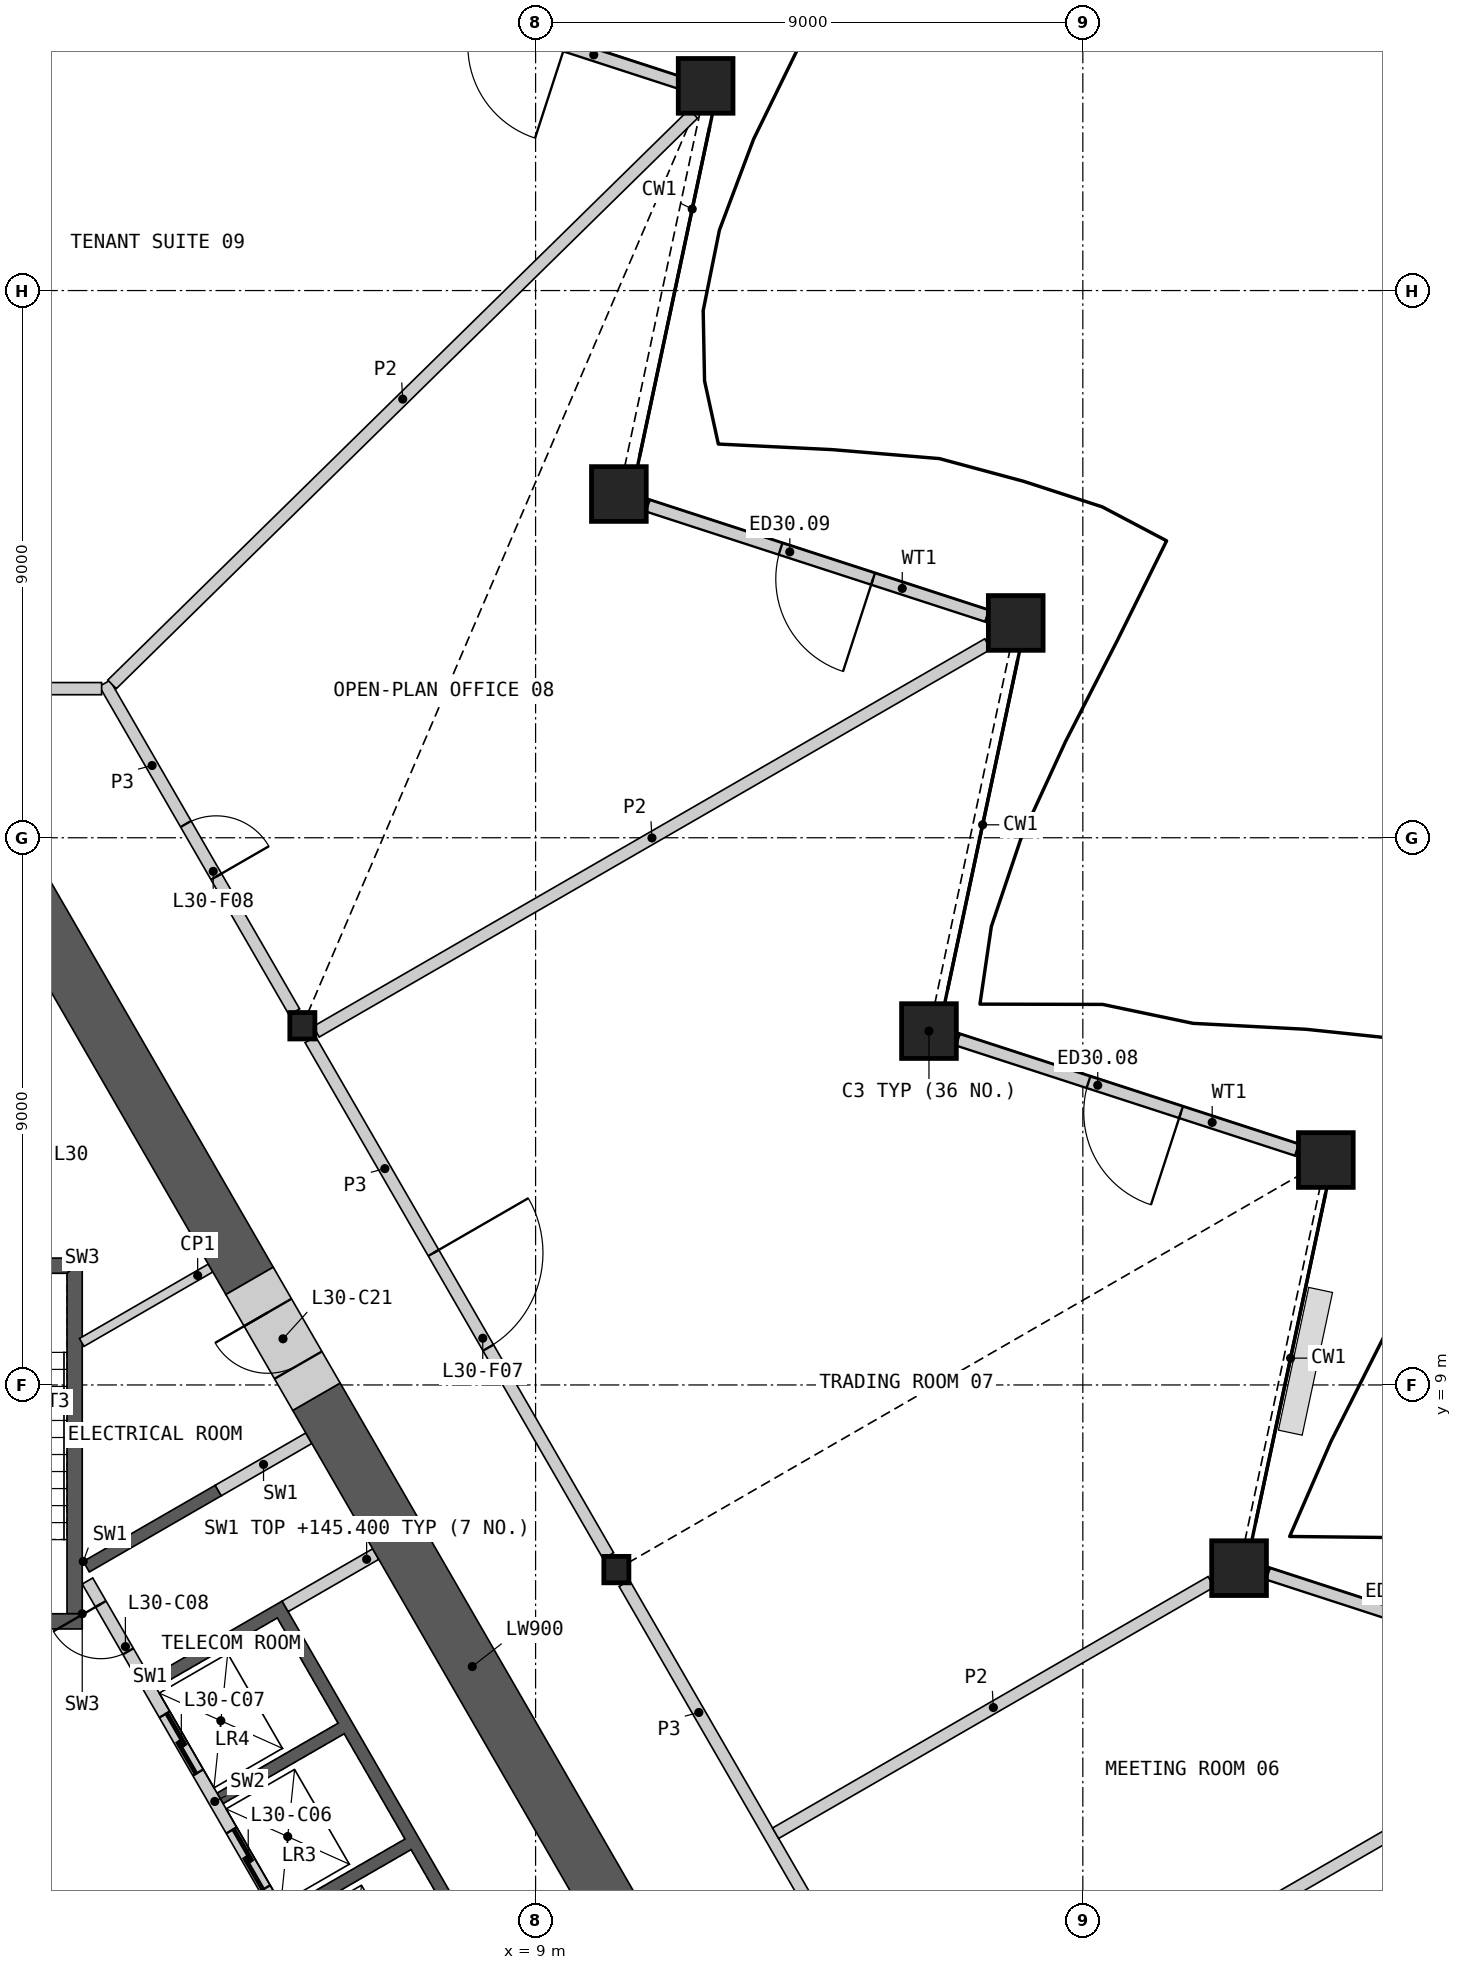
"""IFC4 building model, lengths in metres.
Left out: names, types, materials, properties, quantities, classifications, styles, units other than length and angle.
Written with IfcOpenShell. Run it as: python <this file> out.ifc"""

import sys

from ifc_helpers import new_model, si_unit, direction, frame, frame_2d, origin, origin_2d, place, context, subcontext, project, spatial, polyline, rectangle, hollow_rectangle, i_section, outline, extrude, element, fill, save


model = new_model("IFC4")
c1 = context("Model", 3, precision=1e-05, world=origin(), true_north=direction((0.0, 1.0)))
c2 = subcontext(c1, "Body", "Model", "MODEL_VIEW")
j1 = project(units=[si_unit("LENGTHUNIT", "METRE"), si_unit("PLANEANGLEUNIT", "RADIAN")], contexts=[c1])
p1 = place(None, origin())
s1 = spatial("IfcSite", under=j1, at=p1, CompositionType="ELEMENT")
p2 = place(p1, origin())
s2 = spatial("IfcBuilding", under=s1, at=p2, CompositionType="ELEMENT")
p3 = place(p2, frame((0.0, 0.0, 141.6)))
s3 = spatial("IfcBuildingStorey", under=s2, at=p3, CompositionType="ELEMENT", Elevation=141.6)
for number, where, z_axis, x_axis in (
    (1, (20.57, 5.987, 0.0), (0.0, 0.0, 1.0), (1.0, 0.0, 0.0)),
    (2, (21.996, 12.699, 0.0), (0.0, 0.0, 1.0), (1.0, 0.0, 0.0)),
    (3, (15.469, 14.82, 0.0), (0.0, 0.0, 1.0), (1.0, 0.0, 0.0)),
    (4, (16.896, 21.533, 0.0), (0.0, 0.0, 1.0), (1.0, 0.0, 0.0)),
    (5, (10.37, 23.654, 0.0), (0.0, 0.0, 1.0), (1.0, 0.0, 0.0)),
    (6, (11.796, 30.366, 0.0), (0.0, 0.0, 1.0), (1.0, 0.0, 0.0)),
):
    element("IfcColumn", number, at=place(p3, frame(where, z_axis=z_axis, x_axis=x_axis)), inside=s3, PredefinedType="COLUMN", context=c2, shape_type="SweptSolid", body=[
        extrude(hollow_rectangle(XDim=0.9, YDim=0.9, WallThickness=0.06, at=origin_2d()), origin(), (0.0, 0.0, 1.0), 4.2),
    ])
for number, where, z_axis, x_axis in (
    (7, (10.328, 5.963, 0.0), (0.0, 0.0, 1.0), (1.0, 0.0, 0.0)),
    (8, (5.164, 14.908, 0.0), (0.0, 0.0, 1.0), (1.0, 0.0, 0.0)),
):
    element("IfcColumn", number, at=place(p3, frame(where, z_axis=z_axis, x_axis=x_axis)), inside=s3, PredefinedType="COLUMN", context=c2, shape_type="SweptSolid", body=[
        extrude(i_section(OverallWidth=0.412, OverallDepth=0.435, WebThickness=0.036, FlangeThickness=0.057, at=origin_2d()), origin(), (0.0, 0.0, 1.0), 4.2),
    ])
p4 = place(p3, frame((26.622, 4.082, 0.0), z_axis=(0.0, 0.0, 1.0), x_axis=(-0.951053952554, 0.309024884649, 0.0)))
e9 = element("IfcWall", 9, at=p4, inside=s3, PredefinedType="SOLIDWALL", context=c2, shape_type="SweptSolid", body=[
    extrude(rectangle(XDim=5.865, YDim=0.2, at=frame_2d((2.932, 0.0))), origin(), (0.0, 0.0, 1.0), 3.189),
])
p5 = place(p4, frame((2.042, 0.0, 0.0)))
e10 = element("IfcOpeningElement", 10, at=p5, cuts=e9, PredefinedType="OPENING", context=c2, shape_type="SweptSolid", body=[
    extrude(rectangle(XDim=1.6, YDim=2.4, at=frame_2d((0.8, 1.2))), frame((0.0, 0.11, 0.0), z_axis=(0.0, -1.0, 0.0), x_axis=(1.0, 0.0, 0.0)), (0.0, 0.0, 1.0), 0.22),
])
p6 = place(p3, frame((21.521, 12.865, 0.0), z_axis=(0.0, 0.0, 1.0), x_axis=(-0.951049976734, 0.309037120351, 0.0)))
e11 = element("IfcWall", 11, at=p6, inside=s3, PredefinedType="SOLIDWALL", context=c2, shape_type="SweptSolid", body=[
    extrude(rectangle(XDim=5.864, YDim=0.2, at=frame_2d((2.932, 0.0))), origin(), (0.0, 0.0, 1.0), 3.189),
])
p7 = place(p6, frame((2.005, 0.0, 0.0)))
e12 = element("IfcOpeningElement", 12, at=p7, cuts=e11, PredefinedType="OPENING", context=c2, shape_type="SweptSolid", body=[
    extrude(rectangle(XDim=1.6, YDim=2.4, at=frame_2d((0.8, 1.2))), frame((0.0, 0.11, 0.0), z_axis=(0.0, -1.0, 0.0), x_axis=(1.0, 0.0, 0.0)), (0.0, 0.0, 1.0), 0.22),
])
p8 = place(p3, frame((16.425, 21.647, 0.0), z_axis=(0.0, 0.0, 1.0), x_axis=(-0.951060665462, 0.309004224261, 0.0)))
e13 = element("IfcWall", 13, at=p8, inside=s3, PredefinedType="SOLIDWALL", context=c2, shape_type="SweptSolid", body=[
    extrude(rectangle(XDim=5.868, YDim=0.2, at=frame_2d((2.934, 0.0))), origin(), (0.0, 0.0, 1.0), 3.189),
])
p9 = place(p8, frame((1.971, 0.0, 0.0)))
e14 = element("IfcOpeningElement", 14, at=p9, cuts=e13, PredefinedType="OPENING", context=c2, shape_type="SweptSolid", body=[
    extrude(rectangle(XDim=1.6, YDim=2.4, at=frame_2d((0.8, 1.2))), frame((0.0, 0.11, 0.0), z_axis=(0.0, -1.0, 0.0), x_axis=(1.0, 0.0, 0.0)), (0.0, 0.0, 1.0), 0.22),
])
p10 = place(p3, frame((11.361, 30.419, 0.0), z_axis=(0.0, 0.0, 1.0), x_axis=(-0.951049866095, 0.309037460836, 0.0)))
e15 = element("IfcWall", 15, at=p10, inside=s3, PredefinedType="SOLIDWALL", context=c2, shape_type="SweptSolid", body=[
    extrude(rectangle(XDim=5.905, YDim=0.2, at=frame_2d((2.953, 0.0))), origin(), (0.0, 0.0, 1.0), 3.189),
])
p11 = place(p10, frame((1.971, 0.0, 0.0)))
e16 = element("IfcOpeningElement", 16, at=p11, cuts=e15, PredefinedType="OPENING", context=c2, shape_type="SweptSolid", body=[
    extrude(rectangle(XDim=1.6, YDim=2.4, at=frame_2d((0.8, 1.2))), frame((0.0, 0.11, 0.0), z_axis=(0.0, -1.0, 0.0), x_axis=(1.0, 0.0, 0.0)), (0.0, 0.0, 1.0), 0.22),
])
p12 = place(p3, origin())
e17 = element("IfcWall", 17, at=p12, inside=s3, PredefinedType="SHEAR", context=c2, shape_type="SweptSolid", body=[
    extrude(outline(polyline([(1.561, 6.097), (3.731, 7.35), (3.831, 7.177), (1.66, 5.924), (1.561, 6.097)])), origin(), (0.0, 0.0, 1.0), 3.8),
])
p13 = place(p3, origin())
e18 = element("IfcWall", 18, at=p13, inside=s3, PredefinedType="SHEAR", context=c2, shape_type="SweptSolid", body=[
    extrude(outline(polyline([(2.66, 4.192), (4.831, 5.445), (8.231, -0.444), (6.061, -1.697), (5.96, -1.524), (7.952, -0.374), (6.952, 1.358), (4.96, 0.208), (4.861, 0.381), (6.852, 1.531), (5.852, 3.263), (3.861, 2.113), (3.76, 2.287), (5.752, 3.437), (4.752, 5.169), (2.76, 4.019), (2.66, 4.192)])), origin(), (0.0, 0.0, 1.0), 3.8),
])
p14 = place(p3, frame((5.817, -1.476, 0.0), z_axis=(0.0, 0.0, 1.0), x_axis=(-0.500002616675, 0.866023893041, 0.0)))
e19 = element("IfcWall", 19, at=p14, inside=s3, PredefinedType="SOLIDWALL", context=c2, shape_type="SweptSolid", body=[
    extrude(rectangle(XDim=8.373, YDim=0.2, at=frame_2d((4.187, 0.0))), origin(), (0.0, 0.0, 1.0), 3.8),
])
p15 = place(p14, frame((0.337, 0.0, 0.0)))
e20 = element("IfcOpeningElement", 20, at=p15, cuts=e19, PredefinedType="OPENING", context=c2, shape_type="SweptSolid", body=[
    extrude(rectangle(XDim=1.1, YDim=2.1, at=frame_2d((0.55, 1.05))), frame((0.0, 0.11, 0.0), z_axis=(0.0, -1.0, 0.0), x_axis=(1.0, 0.0, 0.0)), (0.0, 0.0, 1.0), 0.22),
])
p16 = place(p14, frame((2.537, 0.0, 0.0)))
e21 = element("IfcOpeningElement", 21, at=p16, cuts=e19, PredefinedType="OPENING", context=c2, shape_type="SweptSolid", body=[
    extrude(rectangle(XDim=1.1, YDim=2.1, at=frame_2d((0.55, 1.05))), frame((0.0, 0.11, 0.0), z_axis=(0.0, -1.0, 0.0), x_axis=(1.0, 0.0, 0.0)), (0.0, 0.0, 1.0), 0.22),
])
p17 = place(p14, frame((4.737, 0.0, 0.0)))
e22 = element("IfcOpeningElement", 22, at=p17, cuts=e19, PredefinedType="OPENING", context=c2, shape_type="SweptSolid", body=[
    extrude(rectangle(XDim=1.1, YDim=2.1, at=frame_2d((0.55, 1.05))), frame((0.0, 0.11, 0.0), z_axis=(0.0, -1.0, 0.0), x_axis=(1.0, 0.0, 0.0)), (0.0, 0.0, 1.0), 0.22),
])
p18 = place(p14, frame((7.037, 0.0, 0.0)))
e23 = element("IfcOpeningElement", 23, at=p18, cuts=e19, PredefinedType="OPENING", context=c2, shape_type="SweptSolid", body=[
    extrude(rectangle(XDim=0.9, YDim=2.1, at=frame_2d((0.45, 1.05))), frame((0.0, 0.11, 0.0), z_axis=(0.0, -1.0, 0.0), x_axis=(1.0, 0.0, 0.0)), (0.0, 0.0, 1.0), 0.22),
])
for number, where, z_axis, x_axis in (
    (24, (4.881, 5.358, 0.0), (0.0, 0.0, 1.0), (0.866, 0.5, 0.0)),
    (25, (3.781, 7.263, 0.0), (0.0, 0.0, 1.0), (0.866, 0.5, 0.0)),
):
    element("IfcWall", number, at=place(p3, frame(where, z_axis=z_axis, x_axis=x_axis)), inside=s3, PredefinedType="SHEAR", context=c2, shape_type="SweptSolid", body=[
        extrude(rectangle(XDim=1.72, YDim=0.2, at=frame_2d((0.86, 0.0))), origin(), (0.0, 0.0, 1.0), 3.8),
    ])
p19 = place(p3, origin())
e26 = element("IfcWall", 26, at=p19, inside=s3, PredefinedType="SHEAR", context=c2, shape_type="SweptSolid", body=[
    extrude(outline(polyline([(1.544, 5.237), (1.544, 11.087), (1.294, 10.837), (1.294, 5.237), (1.544, 5.237)])), origin(), (0.0, 0.0, 1.0), 3.8),
])
p20 = place(p3, origin())
e27 = element("IfcWall", 27, at=p20, inside=s3, PredefinedType="SHEAR", context=c2, shape_type="SweptSolid", body=[
    extrude(outline(polyline([(1.544, 11.087), (-1.544, 11.087), (-1.294, 10.837), (1.294, 10.837), (1.544, 11.087)])), origin(), (0.0, 0.0, 1.0), 3.8),
])
p21 = place(p3, frame((1.544, 5.112, 0.0), z_axis=(0.0, 0.0, 1.0), x_axis=(-1.0, 0.0, 0.0)))
e28 = element("IfcWall", 28, at=p21, inside=s3, PredefinedType="SHEAR", context=c2, shape_type="SweptSolid", body=[
    extrude(rectangle(XDim=3.088, YDim=0.25, at=frame_2d((1.544, 0.0))), origin(), (0.0, 0.0, 1.0), 3.8),
])
p22 = place(p21, frame((0.994, 0.0, 0.0)))
e29 = element("IfcOpeningElement", 29, at=p22, cuts=e28, PredefinedType="OPENING", context=c2, shape_type="SweptSolid", body=[
    extrude(rectangle(XDim=1.1, YDim=2.1, at=frame_2d((0.55, 1.05))), frame((0.0, 0.135, 0.0), z_axis=(0.0, -1.0, 0.0), x_axis=(1.0, 0.0, 0.0)), (0.0, 0.0, 1.0), 0.27),
])
p23 = place(p3, frame((3.654, 10.923, 0.0), z_axis=(0.0, 0.0, 1.0), x_axis=(-0.865974546186, -0.5000880776, 0.0)))
e30 = element("IfcWall", 30, at=p23, inside=s3, PredefinedType="PARTITIONING", context=c2, shape_type="SweptSolid", body=[
    extrude(rectangle(XDim=2.447, YDim=0.15, at=frame_2d((1.223, 0.0))), origin(), (0.0, 0.0, 1.0), 3.8),
])
p24 = place(p3, frame((10.521, -0.07, 0.0), z_axis=(0.0, 0.0, 1.0), x_axis=(-0.499997384719, 0.866026913713, 0.0)))
e31 = element("IfcWall", 31, at=p24, inside=s3, PredefinedType="SHEAR", context=c2, shape_type="SweptSolid", body=[
    extrude(rectangle(XDim=10.249, YDim=0.9, at=frame_2d((5.125, 0.0))), origin(), (0.0, 0.0, 1.0), 3.8),
])
p25 = place(p3, frame((4.296, 10.712, 0.0), z_axis=(0.0, 0.0, 1.0), x_axis=(-0.500011000363, 0.866019052629, 0.0)))
e32 = element("IfcWall", 32, at=p25, inside=s3, PredefinedType="SHEAR", context=c2, shape_type="SweptSolid", body=[
    extrude(rectangle(XDim=7.812, YDim=0.9, at=frame_2d((3.906, 0.0))), origin(), (0.0, 0.0, 1.0), 3.8),
])
p26 = place(p3, frame((5.396, 8.806, 0.0), z_axis=(0.0, 0.0, 1.0), x_axis=(-0.499981787252, 0.866035918664, 0.0)))
e33 = element("IfcWall", 33, at=p26, inside=s3, PredefinedType="SHEAR", context=c2, shape_type="SweptSolid", body=[
    extrude(rectangle(XDim=2.2, YDim=0.9, at=frame_2d((1.1, 0.0))), origin(), (0.0, 0.0, 1.0), 3.8),
])
p27 = place(p26, frame((0.6, 0.0, 0.0)))
e34 = element("IfcOpeningElement", 34, at=p27, cuts=e33, PredefinedType="OPENING", context=c2, shape_type="SweptSolid", body=[
    extrude(rectangle(XDim=1.0, YDim=2.1, at=frame_2d((0.5, 1.05))), frame((0.0, 0.46, 0.0), z_axis=(0.0, -1.0, 0.0), x_axis=(1.0, 0.0, 0.0)), (0.0, 0.0, 1.0), 0.92),
])
p28 = place(p3, frame((10.46, 5.736, 0.0), z_axis=(0.0, 0.0, 1.0), x_axis=(0.500004141693, -0.866023012564, 0.0)))
e35 = element("IfcWall", 35, at=p28, inside=s3, PredefinedType="PARTITIONING", context=c2, shape_type="SweptSolid", body=[
    extrude(rectangle(XDim=9.803, YDim=0.2, at=frame_2d((4.902, 0.0))), origin(), (0.0, 0.0, 1.0), 3.8),
])
p29 = place(p28, frame((6.853, 0.0, 0.0)))
e36 = element("IfcOpeningElement", 36, at=p29, cuts=e35, PredefinedType="OPENING", context=c2, shape_type="SweptSolid", body=[
    extrude(rectangle(XDim=1.0, YDim=2.1, at=frame_2d((0.5, 1.05))), frame((0.0, 0.11, 0.0), z_axis=(0.0, -1.0, 0.0), x_axis=(1.0, 0.0, 0.0)), (0.0, 0.0, 1.0), 0.22),
])
p30 = place(p3, frame((5.295, 14.68, 0.0), z_axis=(0.0, 0.0, 1.0), x_axis=(0.500012035596, -0.866018454918, 0.0)))
e37 = element("IfcWall", 37, at=p30, inside=s3, PredefinedType="PARTITIONING", context=c2, shape_type="SweptSolid", body=[
    extrude(rectangle(XDim=9.803, YDim=0.2, at=frame_2d((4.902, 0.0))), origin(), (0.0, 0.0, 1.0), 3.8),
])
p31 = place(p30, frame((4.052, 0.0, 0.0)))
e38 = element("IfcOpeningElement", 38, at=p31, cuts=e37, PredefinedType="OPENING", context=c2, shape_type="SweptSolid", body=[
    extrude(rectangle(XDim=1.8, YDim=2.1, at=frame_2d((0.9, 1.05))), frame((0.0, 0.11, 0.0), z_axis=(0.0, -1.0, 0.0), x_axis=(1.0, 0.0, 0.0)), (0.0, 0.0, 1.0), 0.22),
])
p32 = place(p3, frame((1.913, 20.539, 0.0), z_axis=(0.0, 0.0, 1.0), x_axis=(0.499980978912, -0.866036385336, 0.0)))
e39 = element("IfcWall", 39, at=p32, inside=s3, PredefinedType="PARTITIONING", context=c2, shape_type="SweptSolid", body=[
    extrude(rectangle(XDim=6.24, YDim=0.2, at=frame_2d((3.12, 0.0))), origin(), (0.0, 0.0, 1.0), 3.8),
])
p33 = place(p32, frame((2.67, 0.0, 0.0)))
e40 = element("IfcOpeningElement", 40, at=p33, cuts=e39, PredefinedType="OPENING", context=c2, shape_type="SweptSolid", body=[
    extrude(rectangle(XDim=1.0, YDim=2.1, at=frame_2d((0.5, 1.05))), frame((0.0, 0.11, 0.0), z_axis=(0.0, -1.0, 0.0), x_axis=(1.0, 0.0, 0.0)), (0.0, 0.0, 1.0), 0.22),
])
p34 = place(p3, frame((-1.863, 20.453, 0.0), z_axis=(0.0, 0.0, 1.0), x_axis=(1.0, 0.0, 0.0)))
e41 = element("IfcWall", 41, at=p34, inside=s3, PredefinedType="PARTITIONING", context=c2, shape_type="SweptSolid", body=[
    extrude(rectangle(XDim=3.726, YDim=0.2, at=frame_2d((1.863, 0.0))), origin(), (0.0, 0.0, 1.0), 3.8),
])
p35 = place(p34, frame((1.363, 0.0, 0.0)))
e42 = element("IfcOpeningElement", 42, at=p35, cuts=e41, PredefinedType="OPENING", context=c2, shape_type="SweptSolid", body=[
    extrude(rectangle(XDim=1.0, YDim=2.1, at=frame_2d((0.5, 1.05))), frame((0.0, 0.11, 0.0), z_axis=(0.0, -1.0, 0.0), x_axis=(1.0, 0.0, 0.0)), (0.0, 0.0, 1.0), 0.22),
])
p36 = place(p3, frame((2.034, 20.523, 0.0), z_axis=(0.0, 0.0, 1.0), x_axis=(0.713664516359, 0.700487657343, 0.0)))
e43 = element("IfcWall", 43, at=p36, inside=s3, PredefinedType="PARTITIONING", context=c2, shape_type="SweptSolid", body=[
    extrude(rectangle(XDim=13.396, YDim=0.2, at=frame_2d((6.698, 0.0))), origin(), (0.0, 0.0, 1.0), 2.885),
])
p37 = place(p3, frame((15.488, -2.754, 0.0), z_axis=(0.0, 0.0, 1.0), x_axis=(0.866026411352, 0.499998254837, 0.0)))
e44 = element("IfcWall", 44, at=p37, inside=s3, PredefinedType="PARTITIONING", context=c2, shape_type="SweptSolid", body=[
    extrude(rectangle(XDim=12.873, YDim=0.2, at=frame_2d((6.437, 0.0))), origin(), (0.0, 0.0, 1.0), 2.885),
])
p38 = place(p3, frame((5.392, 14.809, 0.0), z_axis=(0.0, 0.0, 1.0), x_axis=(0.866023321739, 0.500003606191, 0.0)))
e45 = element("IfcWall", 45, at=p38, inside=s3, PredefinedType="PARTITIONING", context=c2, shape_type="SweptSolid", body=[
    extrude(rectangle(XDim=12.753, YDim=0.2, at=frame_2d((6.377, 0.0))), origin(), (0.0, 0.0, 1.0), 2.885),
])
p39 = place(p3, frame((12.947, 1.627, 0.0), z_axis=(0.0, 0.0, 1.0), x_axis=(0.866034669089, 0.499983951678, 0.0)))
e46 = element("IfcWall", 46, at=p39, inside=s3, PredefinedType="PARTITIONING", context=c2, shape_type="SweptSolid", body=[
    extrude(rectangle(XDim=8.27, YDim=0.2, at=frame_2d((4.135, 0.0))), origin(), (0.0, 0.0, 1.0), 2.885),
])
p40 = place(p7, origin())
e47 = element("IfcDoor", 47, at=p40, inside=s3, OperationType="DOUBLE_DOOR_SINGLE_SWING", PredefinedType="DOOR", context=c2, shape_type="SweptSolid", body=[
    extrude(rectangle(XDim=1.6, YDim=2.4, at=frame_2d((0.8, 1.2))), frame((0.0, 0.025, 0.0), z_axis=(0.0, -1.0, 0.0), x_axis=(1.0, 0.0, 0.0)), (0.0, 0.0, 1.0), 0.05),
])
fill(e12, e47)
p41 = place(p9, origin())
e48 = element("IfcDoor", 48, at=p41, inside=s3, OperationType="DOUBLE_DOOR_SINGLE_SWING", PredefinedType="DOOR", context=c2, shape_type="SweptSolid", body=[
    extrude(rectangle(XDim=1.6, YDim=2.4, at=frame_2d((0.8, 1.2))), frame((0.0, 0.025, 0.0), z_axis=(0.0, -1.0, 0.0), x_axis=(1.0, 0.0, 0.0)), (0.0, 0.0, 1.0), 0.05),
])
fill(e14, e48)
p42 = place(p16, origin())
e49 = element("IfcDoor", 49, at=p42, inside=s3, OperationType="SLIDING_TO_LEFT", PredefinedType="DOOR", context=c2, shape_type="SweptSolid", body=[
    extrude(rectangle(XDim=1.1, YDim=2.1, at=frame_2d((0.55, 1.05))), frame((0.0, 0.025, 0.0), z_axis=(0.0, -1.0, 0.0), x_axis=(1.0, 0.0, 0.0)), (0.0, 0.0, 1.0), 0.05),
])
fill(e21, e49)
p43 = place(p17, origin())
e50 = element("IfcDoor", 50, at=p43, inside=s3, OperationType="SLIDING_TO_LEFT", PredefinedType="DOOR", context=c2, shape_type="SweptSolid", body=[
    extrude(rectangle(XDim=1.1, YDim=2.1, at=frame_2d((0.55, 1.05))), frame((0.0, 0.025, 0.0), z_axis=(0.0, -1.0, 0.0), x_axis=(1.0, 0.0, 0.0)), (0.0, 0.0, 1.0), 0.05),
])
fill(e22, e50)
p44 = place(p18, origin())
e51 = element("IfcDoor", 51, at=p44, inside=s3, OperationType="SINGLE_SWING_RIGHT", PredefinedType="DOOR", context=c2, shape_type="SweptSolid", body=[
    extrude(rectangle(XDim=0.9, YDim=2.1, at=frame_2d((0.45, 1.05))), frame((0.0, 0.025, 0.0), z_axis=(0.0, -1.0, 0.0), x_axis=(1.0, 0.0, 0.0)), (0.0, 0.0, 1.0), 0.05),
])
fill(e23, e51)
p45 = place(p27, origin())
e52 = element("IfcDoor", 52, at=p45, inside=s3, OperationType="SINGLE_SWING_RIGHT", PredefinedType="DOOR", context=c2, shape_type="SweptSolid", body=[
    extrude(rectangle(XDim=1.0, YDim=2.1, at=frame_2d((0.5, 1.05))), frame((0.0, 0.205, 0.0), z_axis=(0.0, -1.0, 0.0), x_axis=(1.0, 0.0, 0.0)), (0.0, 0.0, 1.0), 0.05),
])
fill(e34, e52)
p46 = place(p31, origin())
e53 = element("IfcDoor", 53, at=p46, inside=s3, OperationType="DOUBLE_DOOR_SINGLE_SWING", PredefinedType="DOOR", context=c2, shape_type="SweptSolid", body=[
    extrude(rectangle(XDim=1.8, YDim=2.1, at=frame_2d((0.9, 1.05))), frame((0.0, 0.025, 0.0), z_axis=(0.0, -1.0, 0.0), x_axis=(1.0, 0.0, 0.0)), (0.0, 0.0, 1.0), 0.05),
])
fill(e38, e53)
p47 = place(p33, origin())
e54 = element("IfcDoor", 54, at=p47, inside=s3, OperationType="SINGLE_SWING_RIGHT", PredefinedType="DOOR", context=c2, shape_type="SweptSolid", body=[
    extrude(rectangle(XDim=1.0, YDim=2.1, at=frame_2d((0.5, 1.05))), frame((0.0, 0.025, 0.0), z_axis=(0.0, -1.0, 0.0), x_axis=(1.0, 0.0, 0.0)), (0.0, 0.0, 1.0), 0.05),
])
fill(e40, e54)
save(model, sys.argv[1])
